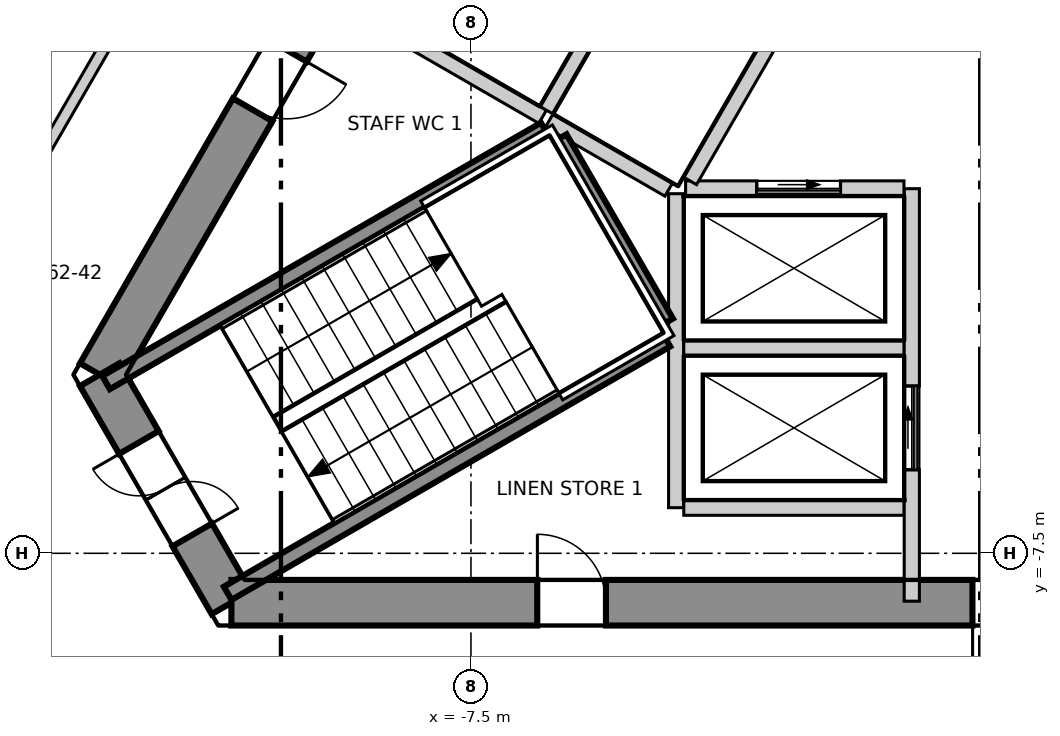
"""IFC4 building model, lengths in metres.
Left out: names, types, materials, properties, quantities, classifications, styles, units other than length and angle.
Written with IfcOpenShell. Run it as: python <this file> out.ifc"""

import sys

from ifc_helpers import new_model, si_unit, direction, frame, frame_2d, origin, place, context, subcontext, project, spatial, polyline, rectangle, outline, extrude, element, fill, save


model = new_model("IFC4")
c1 = context("Model", 3, precision=1e-05, world=origin(), true_north=direction((0.0, 1.0)))
c2 = subcontext(c1, "Body", "Model", "MODEL_VIEW")
j1 = project(units=[si_unit("LENGTHUNIT", "METRE"), si_unit("PLANEANGLEUNIT", "RADIAN")], contexts=[c1])
p1 = place(None, origin())
s1 = spatial("IfcSite", under=j1, at=p1, CompositionType="ELEMENT")
p2 = place(p1, origin())
s2 = spatial("IfcBuilding", under=s1, at=p2, CompositionType="ELEMENT")
p3 = place(p2, frame((0.0, 0.0, 268.3)))
s3 = spatial("IfcBuildingStorey", under=s2, at=p3, CompositionType="ELEMENT", Elevation=268.3)
p4 = place(p3, frame((-1.732, 13.3, -0.3), z_axis=(0.0, 0.0, 1.0), x_axis=(-0.500000539815, -0.866025092122, 0.0)))
e1 = element("IfcWall", 1, at=p4, inside=s3, PredefinedType="SHEAR", context=c2, shape_type="SweptSolid", body=[
    extrude(outline(polyline([(-0.173, -0.3), (1.795, -0.3), (3.763, -0.3), (5.732, -0.3), (7.7, -0.3), (9.668, -0.301), (11.637, -0.301), (13.605, -0.301), (15.573, -0.301), (17.542, -0.301), (19.51, -0.301), (21.478, -0.301), (21.131, 0.3), (19.226, 0.3), (17.321, 0.3), (15.415, 0.3), (13.51, 0.3), (11.605, 0.3), (9.699, 0.3), (7.794, 0.3), (5.889, 0.3), (3.984, 0.3), (2.078, 0.3), (0.173, 0.3), (-0.173, -0.3)])), origin(), (0.0, 0.0, 1.0), 3.6),
])
p5 = place(p4, frame((10.102, 0.0, 0.3)))
e2 = element("IfcOpeningElement", 2, at=p5, cuts=e1, PredefinedType="OPENING", context=c2, shape_type="SweptSolid", body=[
    extrude(rectangle(XDim=1.1, YDim=2.1, at=frame_2d((0.55, 1.05))), frame((0.0, 0.31, 0.0), z_axis=(0.0, -1.0, 0.0), x_axis=(1.0, 0.0, 0.0)), (0.0, 0.0, 1.0), 0.621),
])
p6 = place(p4, frame((16.378, 0.0, 0.3)))
e3 = element("IfcOpeningElement", 3, at=p6, cuts=e1, PredefinedType="OPENING", context=c2, shape_type="SweptSolid", body=[
    extrude(rectangle(XDim=0.9, YDim=2.1, at=frame_2d((0.45, 1.05))), frame((0.0, 0.31, 0.0), z_axis=(0.0, -1.0, 0.0), x_axis=(1.0, 0.0, 0.0)), (0.0, 0.0, 1.0), 0.621),
])
p7 = place(p4, frame((4.026, 0.0, 0.3)))
e4 = element("IfcOpeningElement", 4, at=p7, cuts=e1, PredefinedType="OPENING", context=c2, shape_type="SweptSolid", body=[
    extrude(rectangle(XDim=0.9, YDim=2.1, at=frame_2d((0.45, 1.05))), frame((0.0, 0.31, 0.0), z_axis=(0.0, -1.0, 0.0), x_axis=(1.0, 0.0, 0.0)), (0.0, 0.0, 1.0), 0.621),
])
p8 = place(p3, frame((-12.384, -5.15, -0.3), z_axis=(0.0, 0.0, 1.0), x_axis=(0.49997462182, -0.866040055388, 0.0)))
e5 = element("IfcWall", 5, at=p8, inside=s3, PredefinedType="SHEAR", context=c2, shape_type="SweptSolid", body=[
    extrude(outline(polyline([(-0.173, -0.301), (1.732, -0.301), (3.637, -0.3), (3.291, 0.3), (1.732, 0.3), (0.173, 0.3), (-0.173, -0.301)])), origin(), (0.0, 0.0, 1.0), 3.6),
])
p9 = place(p8, frame((1.032, 0.0, 0.3)))
e6 = element("IfcOpeningElement", 6, at=p9, cuts=e5, PredefinedType="OPENING", context=c2, shape_type="SweptSolid", body=[
    extrude(rectangle(XDim=1.4, YDim=2.1, at=frame_2d((0.7, 1.05))), frame((0.0, 0.31, 0.0), z_axis=(0.0, -1.0, 0.0), x_axis=(1.0, 0.0, 0.0)), (0.0, 0.0, 1.0), 0.621),
])
p10 = place(p3, frame((-10.652, -8.15, -0.3), z_axis=(0.0, 0.0, 1.0), x_axis=(1.0, 0.0, 0.0)))
e7 = element("IfcWall", 7, at=p10, inside=s3, PredefinedType="SHEAR", context=c2, shape_type="SweptSolid", body=[
    extrude(outline(polyline([(-0.173, -0.3), (1.795, -0.3), (3.763, -0.3), (5.731, -0.3), (7.7, -0.3), (9.668, -0.3), (11.636, -0.3), (13.604, -0.3), (15.573, -0.3), (17.541, -0.3), (19.509, -0.3), (21.477, -0.3), (21.131, 0.3), (19.226, 0.3), (17.321, 0.3), (15.415, 0.3), (13.51, 0.3), (11.605, 0.3), (9.699, 0.3), (7.794, 0.3), (5.889, 0.3), (3.984, 0.3), (2.078, 0.3), (0.173, 0.3), (-0.173, -0.3)])), origin(), (0.0, 0.0, 1.0), 3.6),
])
p11 = place(p10, frame((9.752, 0.0, 0.3)))
e8 = element("IfcOpeningElement", 8, at=p11, cuts=e7, PredefinedType="OPENING", context=c2, shape_type="SweptSolid", body=[
    extrude(rectangle(XDim=1.8, YDim=2.1, at=frame_2d((0.9, 1.05))), frame((0.0, 0.31, 0.0), z_axis=(0.0, -1.0, 0.0), x_axis=(1.0, 0.0, 0.0)), (0.0, 0.0, 1.0), 0.62),
])
p12 = place(p10, frame((4.026, 0.0, 0.3)))
e9 = element("IfcOpeningElement", 9, at=p12, cuts=e7, PredefinedType="OPENING", context=c2, shape_type="SweptSolid", body=[
    extrude(rectangle(XDim=0.9, YDim=2.1, at=frame_2d((0.45, 1.05))), frame((0.0, 0.31, 0.0), z_axis=(0.0, -1.0, 0.0), x_axis=(1.0, 0.0, 0.0)), (0.0, 0.0, 1.0), 0.62),
])
p13 = place(p10, frame((16.198, 0.0, 0.3)))
e10 = element("IfcOpeningElement", 10, at=p13, cuts=e7, PredefinedType="OPENING", context=c2, shape_type="SweptSolid", body=[
    extrude(rectangle(XDim=1.0, YDim=2.1, at=frame_2d((0.5, 1.05))), frame((0.0, 0.31, 0.0), z_axis=(0.0, -1.0, 0.0), x_axis=(1.0, 0.0, 0.0)), (0.0, 0.0, 1.0), 0.62),
])
p14 = place(p3, frame((-2.577, 28.771, 0.0), z_axis=(0.0, 0.0, 1.0), x_axis=(-0.49999909388, -0.866025926932, 0.0)))
e11 = element("IfcWall", 11, at=p14, inside=s3, PredefinedType="ELEMENTEDWALL", context=c2, shape_type="SweptSolid", body=[
    extrude(rectangle(XDim=47.236, YDim=0.2, at=frame_2d((23.618, 0.0))), origin(), (0.0, 0.0, 1.0), 3.3),
])
p15 = place(p14, frame((2.243, 0.0, 0.9)))
e12 = element("IfcOpeningElement", 12, at=p15, cuts=e11, PredefinedType="OPENING", context=c2, shape_type="SweptSolid", body=[
    extrude(rectangle(XDim=3.7, YDim=2.2, at=frame_2d((1.85, 1.1))), frame((0.0, 0.11, 0.0), z_axis=(0.0, -1.0, 0.0), x_axis=(1.0, 0.0, 0.0)), (0.0, 0.0, 1.0), 0.22),
])
p16 = place(p14, frame((7.824, 0.0, 0.9)))
e13 = element("IfcOpeningElement", 13, at=p16, cuts=e11, PredefinedType="OPENING", context=c2, shape_type="SweptSolid", body=[
    extrude(rectangle(XDim=3.7, YDim=2.2, at=frame_2d((1.85, 1.1))), frame((0.0, 0.11, 0.0), z_axis=(0.0, -1.0, 0.0), x_axis=(1.0, 0.0, 0.0)), (0.0, 0.0, 1.0), 0.22),
])
p17 = place(p14, frame((13.406, 0.0, 0.9)))
e14 = element("IfcOpeningElement", 14, at=p17, cuts=e11, PredefinedType="OPENING", context=c2, shape_type="SweptSolid", body=[
    extrude(rectangle(XDim=3.7, YDim=2.2, at=frame_2d((1.85, 1.1))), frame((0.0, 0.11, 0.0), z_axis=(0.0, -1.0, 0.0), x_axis=(1.0, 0.0, 0.0)), (0.0, 0.0, 1.0), 0.22),
])
p18 = place(p14, frame((18.987, 0.0, 0.9)))
e15 = element("IfcOpeningElement", 15, at=p18, cuts=e11, PredefinedType="OPENING", context=c2, shape_type="SweptSolid", body=[
    extrude(rectangle(XDim=3.7, YDim=2.2, at=frame_2d((1.85, 1.1))), frame((0.0, 0.11, 0.0), z_axis=(0.0, -1.0, 0.0), x_axis=(1.0, 0.0, 0.0)), (0.0, 0.0, 1.0), 0.22),
])
p19 = place(p14, frame((24.569, 0.0, 0.9)))
e16 = element("IfcOpeningElement", 16, at=p19, cuts=e11, PredefinedType="OPENING", context=c2, shape_type="SweptSolid", body=[
    extrude(rectangle(XDim=3.7, YDim=2.2, at=frame_2d((1.85, 1.1))), frame((0.0, 0.11, 0.0), z_axis=(0.0, -1.0, 0.0), x_axis=(1.0, 0.0, 0.0)), (0.0, 0.0, 1.0), 0.22),
])
p20 = place(p14, frame((30.15, 0.0, 0.9)))
e17 = element("IfcOpeningElement", 17, at=p20, cuts=e11, PredefinedType="OPENING", context=c2, shape_type="SweptSolid", body=[
    extrude(rectangle(XDim=3.7, YDim=2.2, at=frame_2d((1.85, 1.1))), frame((0.0, 0.11, 0.0), z_axis=(0.0, -1.0, 0.0), x_axis=(1.0, 0.0, 0.0)), (0.0, 0.0, 1.0), 0.22),
])
p21 = place(p14, frame((35.731, 0.0, 0.9)))
e18 = element("IfcOpeningElement", 18, at=p21, cuts=e11, PredefinedType="OPENING", context=c2, shape_type="SweptSolid", body=[
    extrude(rectangle(XDim=3.7, YDim=2.2, at=frame_2d((1.85, 1.1))), frame((0.0, 0.11, 0.0), z_axis=(0.0, -1.0, 0.0), x_axis=(1.0, 0.0, 0.0)), (0.0, 0.0, 1.0), 0.22),
])
p22 = place(p14, frame((41.313, 0.0, 0.9)))
e19 = element("IfcOpeningElement", 19, at=p22, cuts=e11, PredefinedType="OPENING", context=c2, shape_type="SweptSolid", body=[
    extrude(rectangle(XDim=3.7, YDim=2.2, at=frame_2d((1.85, 1.1))), frame((0.0, 0.11, 0.0), z_axis=(0.0, -1.0, 0.0), x_axis=(1.0, 0.0, 0.0)), (0.0, 0.0, 1.0), 0.22),
])
p23 = place(p3, frame((-17.678, -10.12, 0.0), z_axis=(0.0, 0.0, 1.0), x_axis=(0.49998824015, 0.86603219323, 0.0)))
e20 = element("IfcWall", 20, at=p23, inside=s3, PredefinedType="PARTITIONING", context=c2, shape_type="SweptSolid", body=[
    extrude(rectangle(XDim=35.357, YDim=0.15, at=frame_2d((17.678, 0.0))), origin(), (0.0, 0.0, 1.0), 3.3),
])
p24 = place(p23, frame((31.607, 0.0, 0.0)))
e21 = element("IfcOpeningElement", 21, at=p24, cuts=e20, PredefinedType="OPENING", context=c2, shape_type="SweptSolid", body=[
    extrude(rectangle(XDim=1.0, YDim=2.1, at=frame_2d((0.5, 1.05))), frame((0.0, 0.085, 0.0), z_axis=(0.0, -1.0, 0.0), x_axis=(1.0, 0.0, 0.0)), (0.0, 0.0, 1.0), 0.17),
])
p25 = place(p23, frame((19.416, 0.0, 0.0)))
e22 = element("IfcOpeningElement", 22, at=p25, cuts=e20, PredefinedType="OPENING", context=c2, shape_type="SweptSolid", body=[
    extrude(rectangle(XDim=1.0, YDim=2.1, at=frame_2d((0.5, 1.05))), frame((0.0, 0.085, 0.0), z_axis=(0.0, -1.0, 0.0), x_axis=(1.0, 0.0, 0.0)), (0.0, 0.0, 1.0), 0.17),
])
p26 = place(p23, frame((24.916, 0.0, 0.0)))
e23 = element("IfcOpeningElement", 23, at=p26, cuts=e20, PredefinedType="OPENING", context=c2, shape_type="SweptSolid", body=[
    extrude(rectangle(XDim=0.9, YDim=2.1, at=frame_2d((0.45, 1.05))), frame((0.0, 0.085, 0.0), z_axis=(0.0, -1.0, 0.0), x_axis=(1.0, 0.0, 0.0)), (0.0, 0.0, 1.0), 0.17),
])
p27 = place(p23, frame((22.816, 0.0, 0.0)))
e24 = element("IfcOpeningElement", 24, at=p27, cuts=e20, PredefinedType="OPENING", context=c2, shape_type="SweptSolid", body=[
    extrude(rectangle(XDim=0.9, YDim=2.1, at=frame_2d((0.45, 1.05))), frame((0.0, 0.085, 0.0), z_axis=(0.0, -1.0, 0.0), x_axis=(1.0, 0.0, 0.0)), (0.0, 0.0, 1.0), 0.17),
])
p28 = place(p23, frame((14.654, 0.0, 0.0)))
e25 = element("IfcOpeningElement", 25, at=p28, cuts=e20, PredefinedType="OPENING", context=c2, shape_type="SweptSolid", body=[
    extrude(rectangle(XDim=1.0, YDim=2.1, at=frame_2d((0.5, 1.05))), frame((0.0, 0.085, 0.0), z_axis=(0.0, -1.0, 0.0), x_axis=(1.0, 0.0, 0.0)), (0.0, 0.0, 1.0), 0.17),
])
p29 = place(p23, frame((7.672, 0.0, 0.0)))
e26 = element("IfcOpeningElement", 26, at=p29, cuts=e20, PredefinedType="OPENING", context=c2, shape_type="SweptSolid", body=[
    extrude(rectangle(XDim=1.0, YDim=2.1, at=frame_2d((0.5, 1.05))), frame((0.0, 0.085, 0.0), z_axis=(0.0, -1.0, 0.0), x_axis=(1.0, 0.0, 0.0)), (0.0, 0.0, 1.0), 0.17),
])
p30 = place(p23, frame((2.69, 0.0, 0.0)))
e27 = element("IfcOpeningElement", 27, at=p30, cuts=e20, PredefinedType="OPENING", context=c2, shape_type="SweptSolid", body=[
    extrude(rectangle(XDim=1.0, YDim=2.1, at=frame_2d((0.5, 1.05))), frame((0.0, 0.085, 0.0), z_axis=(0.0, -1.0, 0.0), x_axis=(1.0, 0.0, 0.0)), (0.0, 0.0, 1.0), 0.17),
])
p31 = place(p3, frame((-8.376, -0.707, 0.0), z_axis=(0.0, 0.0, 1.0), x_axis=(0.866067520717, -0.499927044236, 0.0)))
e28 = element("IfcWall", 28, at=p31, inside=s3, PredefinedType="SOLIDWALL", context=c2, shape_type="SweptSolid", body=[
    extrude(rectangle(XDim=2.1, YDim=0.2, at=frame_2d((1.05, 0.0))), origin(), (0.0, 0.0, 1.0), 3.3),
])
p32 = place(p3, frame((-4.8, -6.9, 0.0), z_axis=(0.0, 0.0, 1.0), x_axis=(0.0, 1.0, 0.0)))
e29 = element("IfcWall", 29, at=p32, inside=s3, PredefinedType="SOLIDWALL", context=c2, shape_type="SweptSolid", body=[
    extrude(rectangle(XDim=4.131, YDim=0.2, at=frame_2d((2.065, 0.0))), origin(), (0.0, 0.0, 1.0), 3.3),
])
for number, where, z_axis, x_axis in (
    (30, (-4.7, -6.9, 0.0), (0.0, 0.0, 1.0), (1.0, 0.0, 0.0)),
    (31, (-4.7, -4.8, 0.0), (0.0, 0.0, 1.0), (1.0, 0.0, 0.0)),
):
    element("IfcWall", number, at=place(p3, frame(where, z_axis=z_axis, x_axis=x_axis)), inside=s3, PredefinedType="SOLIDWALL", context=c2, shape_type="SweptSolid", body=[
        extrude(rectangle(XDim=2.9, YDim=0.2, at=frame_2d((1.45, 0.0))), origin(), (0.0, 0.0, 1.0), 3.3),
    ])
p33 = place(p3, frame((-1.7, -8.13, 0.0), z_axis=(0.0, 0.0, 1.0), x_axis=(0.0, 1.0, 0.0)))
e32 = element("IfcWall", 32, at=p33, inside=s3, PredefinedType="SOLIDWALL", context=c2, shape_type="SweptSolid", body=[
    extrude(rectangle(XDim=5.427, YDim=0.2, at=frame_2d((2.713, 0.0))), origin(), (0.0, 0.0, 1.0), 3.3),
])
p34 = place(p33, frame((1.73, 0.0, 0.0)))
e33 = element("IfcOpeningElement", 33, at=p34, cuts=e32, PredefinedType="OPENING", context=c2, shape_type="SweptSolid", body=[
    extrude(rectangle(XDim=1.1, YDim=2.1, at=frame_2d((0.55, 1.05))), frame((0.0, 0.11, 0.0), z_axis=(0.0, -1.0, 0.0), x_axis=(1.0, 0.0, 0.0)), (0.0, 0.0, 1.0), 0.22),
])
p35 = place(p3, frame((-4.676, -2.7, 0.0), z_axis=(0.0, 0.0, 1.0), x_axis=(1.0, 0.0, 0.0)))
e34 = element("IfcWall", 34, at=p35, inside=s3, PredefinedType="SOLIDWALL", context=c2, shape_type="SweptSolid", body=[
    extrude(rectangle(XDim=2.873, YDim=0.2, at=frame_2d((1.437, 0.0))), origin(), (0.0, 0.0, 1.0), 3.3),
])
p36 = place(p35, frame((0.937, 0.0, 0.0)))
e35 = element("IfcOpeningElement", 35, at=p36, cuts=e34, PredefinedType="OPENING", context=c2, shape_type="SweptSolid", body=[
    extrude(rectangle(XDim=1.1, YDim=2.1, at=frame_2d((0.55, 1.05))), frame((0.0, 0.11, 0.0), z_axis=(0.0, -1.0, 0.0), x_axis=(1.0, 0.0, 0.0)), (0.0, 0.0, 1.0), 0.22),
])
p37 = place(p3, frame((-6.507, -1.67, 0.0), z_axis=(0.0, 0.0, 1.0), x_axis=(0.50012328804, 0.865954211699, 0.0)))
e36 = element("IfcWall", 36, at=p37, inside=s3, PredefinedType="SOLIDWALL", context=c2, shape_type="SweptSolid", body=[
    extrude(rectangle(XDim=2.9, YDim=0.2, at=frame_2d((1.45, 0.0))), origin(), (0.0, 0.0, 1.0), 3.3),
])
p38 = place(p3, frame((-6.47, -1.807, 0.0), z_axis=(0.0, 0.0, 1.0), x_axis=(0.865883195159, -0.500246231712, 0.0)))
e37 = element("IfcWall", 37, at=p38, inside=s3, PredefinedType="SOLIDWALL", context=c2, shape_type="SweptSolid", body=[
    extrude(rectangle(XDim=1.815, YDim=0.2, at=frame_2d((0.908, 0.0))), origin(), (0.0, 0.0, 1.0), 3.3),
])
p39 = place(p3, frame((-4.619, -2.6, 0.0), z_axis=(0.0, 0.0, 1.0), x_axis=(0.50009492287, 0.865970593103, 0.0)))
e38 = element("IfcWall", 38, at=p39, inside=s3, PredefinedType="SOLIDWALL", context=c2, shape_type="SweptSolid", body=[
    extrude(rectangle(XDim=2.761, YDim=0.2, at=frame_2d((1.381, 0.0))), origin(), (0.0, 0.0, 1.0), 3.3),
])
p40 = place(p3, frame((-12.301, -5.254, 0.0), z_axis=(0.0, 0.0, 1.0), x_axis=(0.866068467981, 0.499925403204, 0.0)))
e39 = element("IfcWall", 39, at=p40, inside=s3, PredefinedType="SOLIDWALL", context=c2, shape_type="SweptSolid", body=[
    extrude(rectangle(XDim=6.665, YDim=0.2, at=frame_2d((3.332, 0.0))), origin(), (0.0, 0.0, 1.0), 3.3),
])
p41 = place(p3, frame((-6.329, -2.038, 0.0), z_axis=(0.0, 0.0, 1.0), x_axis=(0.500200581029, -0.865909567298, 0.0)))
e40 = element("IfcWall", 40, at=p41, inside=s3, PredefinedType="SOLIDWALL", context=c2, shape_type="SweptSolid", body=[
    extrude(rectangle(XDim=2.799, YDim=0.2, at=frame_2d((1.399, 0.0))), origin(), (0.0, 0.0, 1.0), 3.3),
])
p42 = place(p3, frame((-10.701, -8.026, 0.0), z_axis=(0.0, 0.0, 1.0), x_axis=(0.866005022404, 0.500035299925, 0.0)))
e41 = element("IfcWall", 41, at=p42, inside=s3, PredefinedType="SOLIDWALL", context=c2, shape_type="SweptSolid", body=[
    extrude(rectangle(XDim=6.665, YDim=0.2, at=frame_2d((3.333, 0.0))), origin(), (0.0, 0.0, 1.0), 3.3),
])
p43 = place(p36, origin())
e42 = element("IfcDoor", 42, at=p43, inside=s3, OperationType="SLIDING_TO_LEFT", PredefinedType="DOOR", context=c2, shape_type="SweptSolid", body=[
    extrude(rectangle(XDim=1.1, YDim=2.1, at=frame_2d((0.55, 1.05))), frame((0.0, 0.025, 0.0), z_axis=(0.0, -1.0, 0.0), x_axis=(1.0, 0.0, 0.0)), (0.0, 0.0, 1.0), 0.05),
])
fill(e35, e42)
p44 = place(p34, origin())
e43 = element("IfcDoor", 43, at=p44, inside=s3, OperationType="SLIDING_TO_LEFT", PredefinedType="DOOR", context=c2, shape_type="SweptSolid", body=[
    extrude(rectangle(XDim=1.1, YDim=2.1, at=frame_2d((0.55, 1.05))), frame((0.0, 0.025, 0.0), z_axis=(0.0, -1.0, 0.0), x_axis=(1.0, 0.0, 0.0)), (0.0, 0.0, 1.0), 0.05),
])
fill(e33, e43)
p45 = place(p11, origin())
e44 = element("IfcDoor", 44, at=p45, inside=s3, OperationType="DOUBLE_DOOR_SINGLE_SWING", PredefinedType="DOOR", context=c2, shape_type="SweptSolid", body=[
    extrude(rectangle(XDim=1.8, YDim=2.1, at=frame_2d((0.9, 1.05))), frame((0.0, 0.025, 0.0), z_axis=(0.0, -1.0, 0.0), x_axis=(1.0, 0.0, 0.0)), (0.0, 0.0, 1.0), 0.05),
])
fill(e8, e44)
p46 = place(p9, origin())
e45 = element("IfcDoor", 45, at=p46, inside=s3, OperationType="DOUBLE_DOOR_SINGLE_SWING", PredefinedType="DOOR", context=c2, shape_type="SweptSolid", body=[
    extrude(rectangle(XDim=1.4, YDim=2.1, at=frame_2d((0.7, 1.05))), frame((0.0, 0.025, 0.0), z_axis=(0.0, -1.0, 0.0), x_axis=(1.0, 0.0, 0.0)), (0.0, 0.0, 1.0), 0.05),
])
fill(e6, e45)
p47 = place(p6, origin())
e46 = element("IfcDoor", 46, at=p47, inside=s3, OperationType="SINGLE_SWING_RIGHT", PredefinedType="DOOR", context=c2, shape_type="SweptSolid", body=[
    extrude(rectangle(XDim=0.9, YDim=2.1, at=frame_2d((0.45, 1.05))), frame((0.0, 0.025, 0.0), z_axis=(0.0, -1.0, 0.0), x_axis=(1.0, 0.0, 0.0)), (0.0, 0.0, 1.0), 0.05),
])
fill(e3, e46)
p48 = place(p12, origin())
e47 = element("IfcDoor", 47, at=p48, inside=s3, OperationType="SINGLE_SWING_RIGHT", PredefinedType="DOOR", context=c2, shape_type="SweptSolid", body=[
    extrude(rectangle(XDim=0.9, YDim=2.1, at=frame_2d((0.45, 1.05))), frame((0.0, 0.025, 0.0), z_axis=(0.0, -1.0, 0.0), x_axis=(1.0, 0.0, 0.0)), (0.0, 0.0, 1.0), 0.05),
])
fill(e9, e47)
save(model, sys.argv[1])
